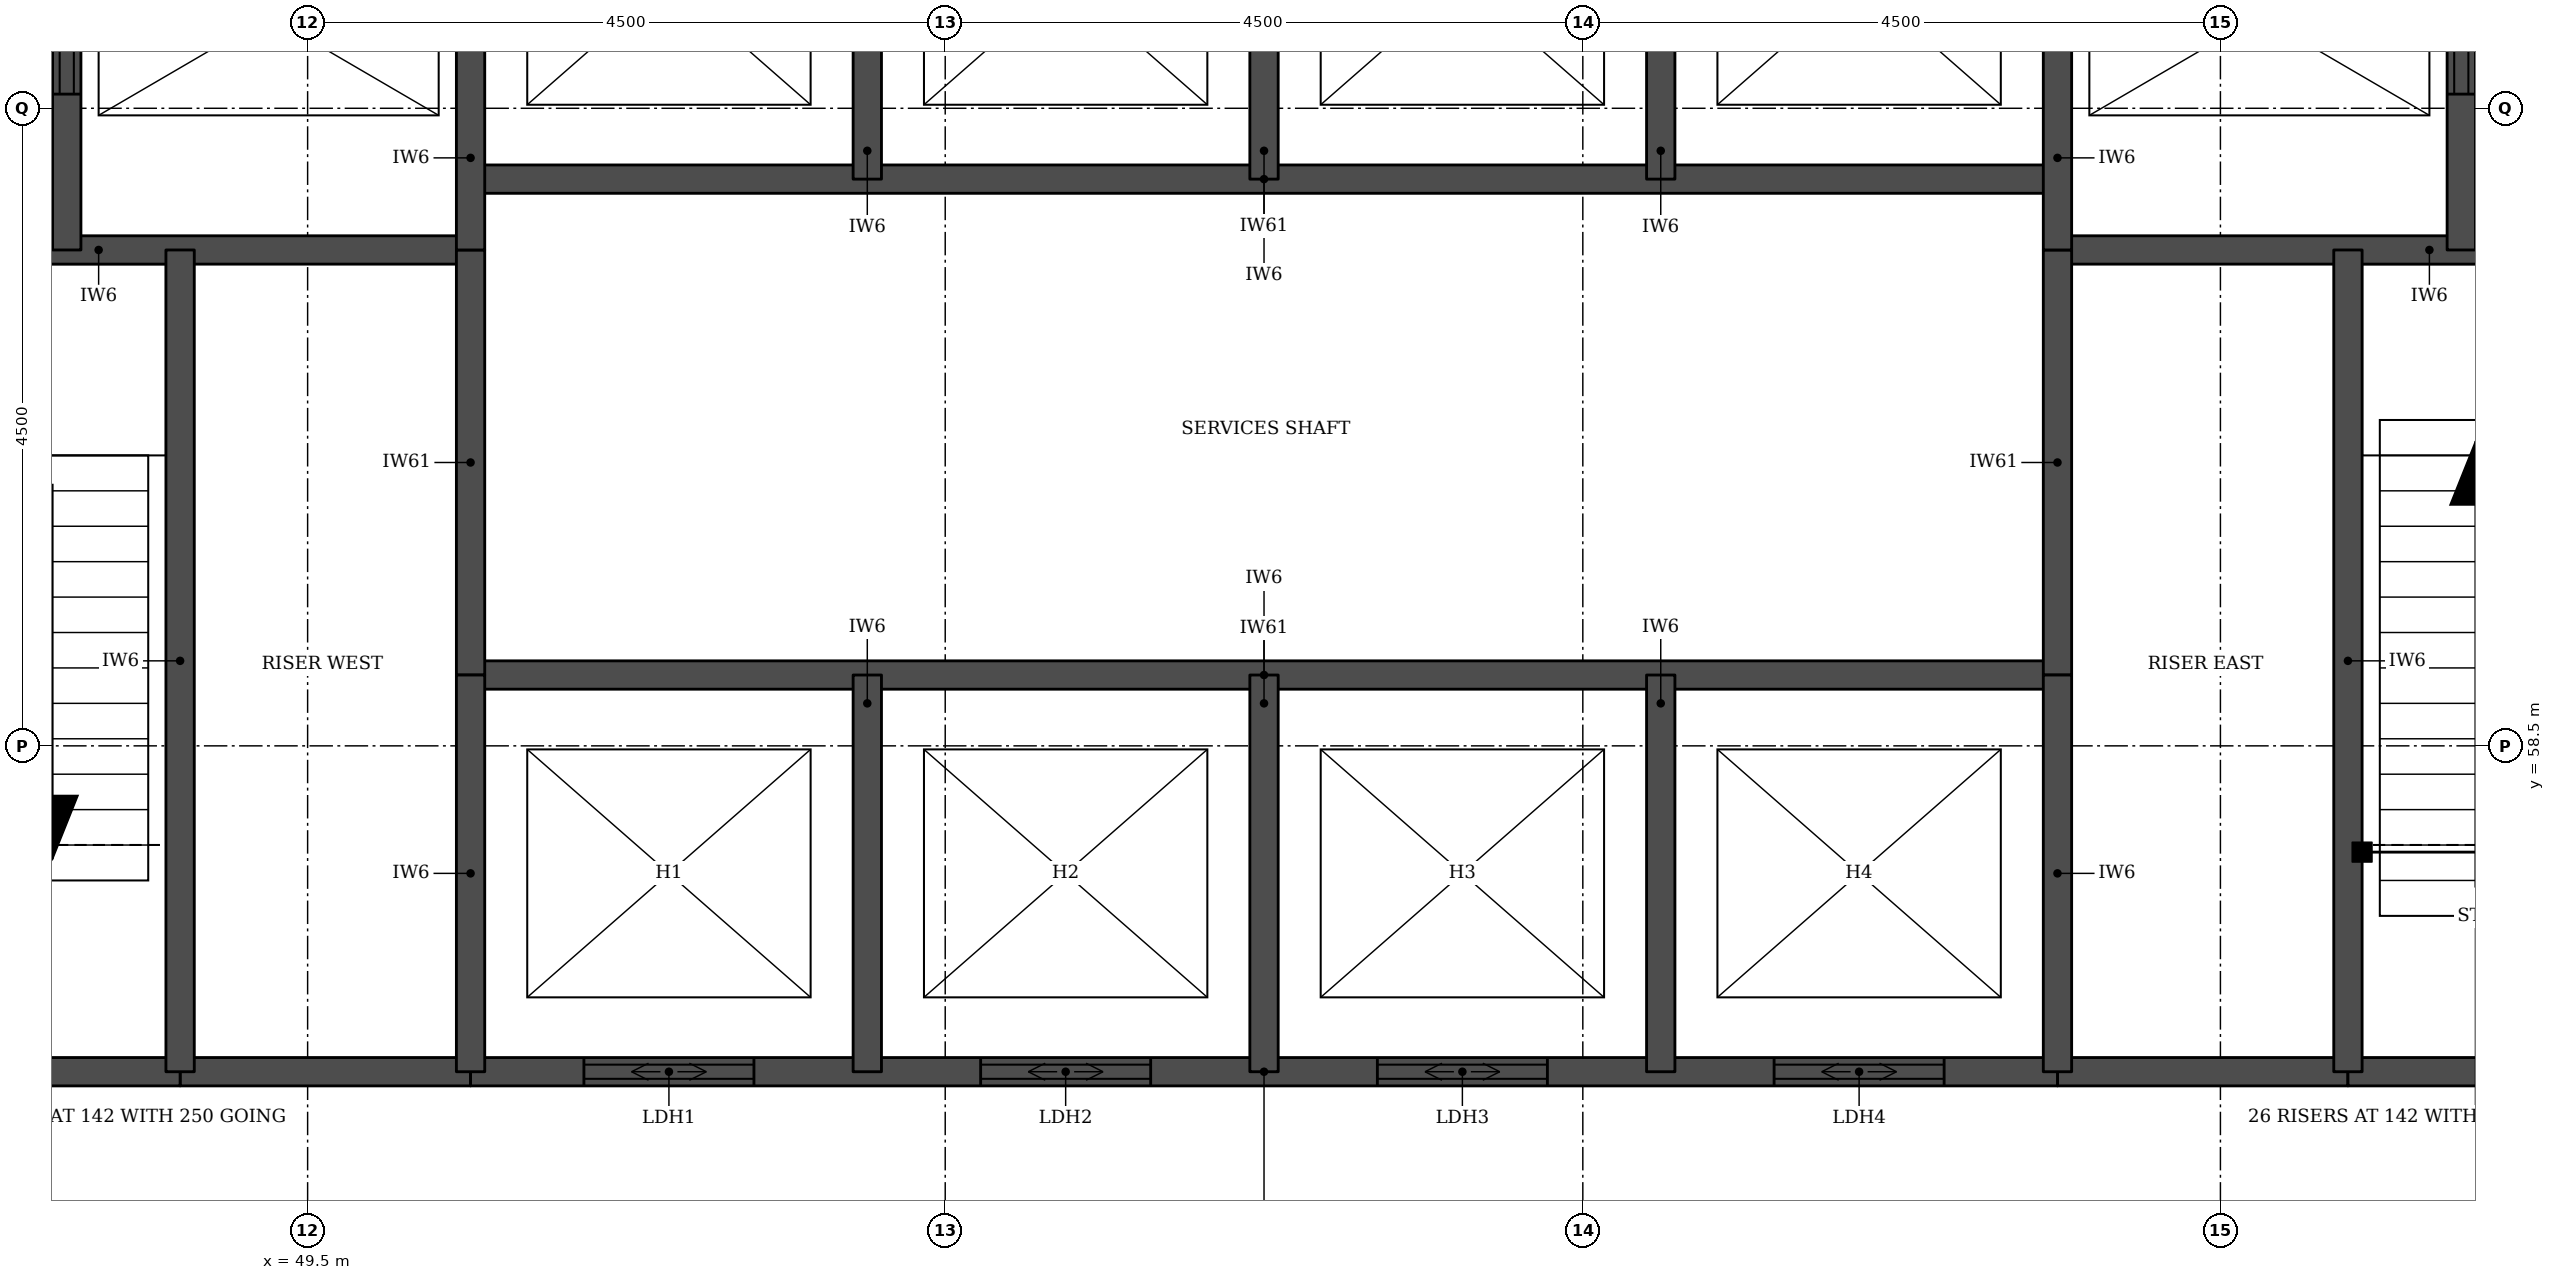
"""IFC4 building model, lengths in metres.
Left out: names, types, materials, properties, quantities, classifications, styles, units other than length and angle.
Written with IfcOpenShell. Run it as: python <this file> out.ifc"""

import sys

from ifc_helpers import new_model, si_unit, direction, frame, frame_2d, origin, place, context, subcontext, project, spatial, rectangle, extrude, element, fill, save


model = new_model("IFC4")
c1 = context("Model", 3, precision=1e-05, world=origin(), true_north=direction((0.0, 1.0)))
c2 = subcontext(c1, "Body", "Model", "MODEL_VIEW")
j1 = project(units=[si_unit("LENGTHUNIT", "METRE"), si_unit("PLANEANGLEUNIT", "RADIAN")], contexts=[c1])
p1 = place(None, origin())
s1 = spatial("IfcSite", under=j1, at=p1, CompositionType="ELEMENT")
p2 = place(p1, origin())
s2 = spatial("IfcBuilding", under=s1, at=p2, CompositionType="ELEMENT")
p3 = place(p2, frame((0.0, 0.0, 184.7)))
s3 = spatial("IfcBuildingStorey", under=s2, at=p3, CompositionType="ELEMENT", Elevation=184.7)
for number, where, z_axis, x_axis in (
    (1, (48.6, 56.2, 0.0), (0.0, 0.0, 1.0), (1.0, 0.0, 0.0)),
    (2, (61.85, 56.2, 0.0), (0.0, 0.0, 1.0), (1.0, 0.0, 0.0)),
):
    element("IfcWall", number, at=place(p3, frame(where, z_axis=z_axis, x_axis=x_axis)), inside=s3, PredefinedType="SOLIDWALL", context=c2, shape_type="SweptSolid", body=[
        extrude(rectangle(XDim=2.05, YDim=0.2, at=frame_2d((1.025, 0.0))), origin(), (0.0, 0.0, 1.0), 3.55),
    ])
p4 = place(p3, frame((45.4, 56.2, 0.0), z_axis=(0.0, 0.0, 1.0), x_axis=(1.0, 0.0, 0.0)))
e3 = element("IfcWall", 3, at=p4, inside=s3, PredefinedType="SOLIDWALL", context=c2, shape_type="SweptSolid", body=[
    extrude(rectangle(XDim=3.2, YDim=0.2, at=frame_2d((1.6, 0.0))), origin(), (0.0, 0.0, 1.0), 3.55),
])
p5 = place(p3, frame((50.65, 56.2, 0.0), z_axis=(0.0, 0.0, 1.0), x_axis=(1.0, 0.0, 0.0)))
e4 = element("IfcWall", 4, at=p5, inside=s3, PredefinedType="SOLIDWALL", context=c2, shape_type="SweptSolid", body=[
    extrude(rectangle(XDim=11.2, YDim=0.2, at=frame_2d((5.6, 0.0))), origin(), (0.0, 0.0, 1.0), 3.55),
])
p6 = place(p5, frame((0.8, 0.0, 0.0)))
e5 = element("IfcOpeningElement", 5, at=p6, cuts=e4, PredefinedType="OPENING", context=c2, shape_type="SweptSolid", body=[
    extrude(rectangle(XDim=1.2, YDim=2.1, at=frame_2d((0.6, 1.05))), frame((0.0, 0.11, 0.0), z_axis=(0.0, -1.0, 0.0), x_axis=(1.0, 0.0, 0.0)), (0.0, 0.0, 1.0), 0.22),
])
p7 = place(p5, frame((3.6, 0.0, 0.0)))
e6 = element("IfcOpeningElement", 6, at=p7, cuts=e4, PredefinedType="OPENING", context=c2, shape_type="SweptSolid", body=[
    extrude(rectangle(XDim=1.2, YDim=2.1, at=frame_2d((0.6, 1.05))), frame((0.0, 0.11, 0.0), z_axis=(0.0, -1.0, 0.0), x_axis=(1.0, 0.0, 0.0)), (0.0, 0.0, 1.0), 0.22),
])
p8 = place(p5, frame((6.4, 0.0, 0.0)))
e7 = element("IfcOpeningElement", 7, at=p8, cuts=e4, PredefinedType="OPENING", context=c2, shape_type="SweptSolid", body=[
    extrude(rectangle(XDim=1.2, YDim=2.1, at=frame_2d((0.6, 1.05))), frame((0.0, 0.11, 0.0), z_axis=(0.0, -1.0, 0.0), x_axis=(1.0, 0.0, 0.0)), (0.0, 0.0, 1.0), 0.22),
])
p9 = place(p5, frame((9.2, 0.0, 0.0)))
e8 = element("IfcOpeningElement", 8, at=p9, cuts=e4, PredefinedType="OPENING", context=c2, shape_type="SweptSolid", body=[
    extrude(rectangle(XDim=1.2, YDim=2.1, at=frame_2d((0.6, 1.05))), frame((0.0, 0.11, 0.0), z_axis=(0.0, -1.0, 0.0), x_axis=(1.0, 0.0, 0.0)), (0.0, 0.0, 1.0), 0.22),
])
p10 = place(p3, frame((63.9, 56.2, 0.0), z_axis=(0.0, 0.0, 1.0), x_axis=(1.0, 0.0, 0.0)))
e9 = element("IfcWall", 9, at=p10, inside=s3, PredefinedType="SOLIDWALL", context=c2, shape_type="SweptSolid", body=[
    extrude(rectangle(XDim=3.2, YDim=0.2, at=frame_2d((1.6, 0.0))), origin(), (0.0, 0.0, 1.0), 3.55),
])
p11 = place(p3, frame((50.65, 59.0, 0.0), z_axis=(0.0, 0.0, 1.0), x_axis=(1.0, 0.0, 0.0)))
e10 = element("IfcWall", 10, at=p11, inside=s3, PredefinedType="SOLIDWALL", context=c2, shape_type="SweptSolid", body=[
    extrude(rectangle(XDim=11.2, YDim=0.2, at=frame_2d((5.6, 0.0))), origin(), (0.0, 0.0, 1.0), 3.7),
])
for number, where, z_axis, x_axis in (
    (11, (45.4, 62.0, 0.0), (0.0, 0.0, 1.0), (1.0, 0.0, 0.0)),
    (12, (61.85, 62.0, 0.0), (0.0, 0.0, 1.0), (1.0, 0.0, 0.0)),
):
    element("IfcWall", number, at=place(p3, frame(where, z_axis=z_axis, x_axis=x_axis)), inside=s3, PredefinedType="SOLIDWALL", context=c2, shape_type="SweptSolid", body=[
        extrude(rectangle(XDim=5.25, YDim=0.2, at=frame_2d((2.625, 0.0))), origin(), (0.0, 0.0, 1.0), 3.55),
    ])
p12 = place(p3, frame((50.65, 62.5, 0.0), z_axis=(0.0, 0.0, 1.0), x_axis=(1.0, 0.0, 0.0)))
e13 = element("IfcWall", 13, at=p12, inside=s3, PredefinedType="SOLIDWALL", context=c2, shape_type="SweptSolid", body=[
    extrude(rectangle(XDim=11.2, YDim=0.2, at=frame_2d((5.6, 0.0))), origin(), (0.0, 0.0, 1.0), 3.7),
])
p13 = place(p3, frame((47.8, 62.0, 0.0), z_axis=(0.0, 0.0, 1.0), x_axis=(0.0, 1.0, 0.0)))
e14 = element("IfcWall", 14, at=p13, inside=s3, PredefinedType="SOLIDWALL", context=c2, shape_type="SweptSolid", body=[
    extrude(rectangle(XDim=3.3, YDim=0.2, at=frame_2d((1.65, 0.0))), origin(), (0.0, 0.0, 1.0), 3.55),
])
p14 = place(p13, frame((1.1, 0.0, 0.0)))
e15 = element("IfcOpeningElement", 15, at=p14, cuts=e14, PredefinedType="OPENING", context=c2, shape_type="SweptSolid", body=[
    extrude(rectangle(XDim=1.1, YDim=2.1, at=frame_2d((0.55, 1.05))), frame((0.0, 0.11, 0.0), z_axis=(0.0, -1.0, 0.0), x_axis=(1.0, 0.0, 0.0)), (0.0, 0.0, 1.0), 0.22),
])
p15 = place(p3, frame((48.6, 56.2, 0.0), z_axis=(0.0, 0.0, 1.0), x_axis=(0.0, 1.0, 0.0)))
e16 = element("IfcWall", 16, at=p15, inside=s3, PredefinedType="SOLIDWALL", context=c2, shape_type="SweptSolid", body=[
    extrude(rectangle(XDim=5.8, YDim=0.2, at=frame_2d((2.9, 0.0))), origin(), (0.0, 0.0, 1.0), 3.55),
])
p16 = place(p3, frame((50.65, 59.0, 0.0), z_axis=(0.0, 0.0, 1.0), x_axis=(0.0, 1.0, 0.0)))
e17 = element("IfcWall", 17, at=p16, inside=s3, PredefinedType="SOLIDWALL", context=c2, shape_type="SweptSolid", body=[
    extrude(rectangle(XDim=3.0, YDim=0.2, at=frame_2d((1.5, 0.0))), origin(), (0.0, 0.0, 1.0), 3.7),
])
p17 = place(p3, frame((50.65, 56.2, 0.0), z_axis=(0.0, 0.0, 1.0), x_axis=(0.0, 1.0, 0.0)))
e18 = element("IfcWall", 18, at=p17, inside=s3, PredefinedType="SOLIDWALL", context=c2, shape_type="SweptSolid", body=[
    extrude(rectangle(XDim=2.8, YDim=0.2, at=frame_2d((1.4, 0.0))), origin(), (0.0, 0.0, 1.0), 3.55),
])
p18 = place(p3, frame((50.65, 62.0, 0.0), z_axis=(0.0, 0.0, 1.0), x_axis=(0.0, 1.0, 0.0)))
e19 = element("IfcWall", 19, at=p18, inside=s3, PredefinedType="SOLIDWALL", context=c2, shape_type="SweptSolid", body=[
    extrude(rectangle(XDim=3.3, YDim=0.2, at=frame_2d((1.65, 0.0))), origin(), (0.0, 0.0, 1.0), 3.55),
])
for number, where, z_axis, x_axis in (
    (20, (53.45, 56.2, 0.0), (0.0, 0.0, 1.0), (0.0, 1.0, 0.0)),
    (21, (53.45, 62.5, 0.0), (0.0, 0.0, 1.0), (0.0, 1.0, 0.0)),
    (22, (56.25, 56.2, 0.0), (0.0, 0.0, 1.0), (0.0, 1.0, 0.0)),
    (23, (56.25, 62.5, 0.0), (0.0, 0.0, 1.0), (0.0, 1.0, 0.0)),
    (24, (59.05, 56.2, 0.0), (0.0, 0.0, 1.0), (0.0, 1.0, 0.0)),
    (25, (59.05, 62.5, 0.0), (0.0, 0.0, 1.0), (0.0, 1.0, 0.0)),
):
    element("IfcWall", number, at=place(p3, frame(where, z_axis=z_axis, x_axis=x_axis)), inside=s3, PredefinedType="SOLIDWALL", context=c2, shape_type="SweptSolid", body=[
        extrude(rectangle(XDim=2.8, YDim=0.2, at=frame_2d((1.4, 0.0))), origin(), (0.0, 0.0, 1.0), 3.55),
    ])
p19 = place(p3, frame((61.85, 59.0, 0.0), z_axis=(0.0, 0.0, 1.0), x_axis=(0.0, 1.0, 0.0)))
e26 = element("IfcWall", 26, at=p19, inside=s3, PredefinedType="SOLIDWALL", context=c2, shape_type="SweptSolid", body=[
    extrude(rectangle(XDim=3.0, YDim=0.2, at=frame_2d((1.5, 0.0))), origin(), (0.0, 0.0, 1.0), 3.7),
])
p20 = place(p3, frame((61.85, 56.2, 0.0), z_axis=(0.0, 0.0, 1.0), x_axis=(0.0, 1.0, 0.0)))
e27 = element("IfcWall", 27, at=p20, inside=s3, PredefinedType="SOLIDWALL", context=c2, shape_type="SweptSolid", body=[
    extrude(rectangle(XDim=2.8, YDim=0.2, at=frame_2d((1.4, 0.0))), origin(), (0.0, 0.0, 1.0), 3.55),
])
p21 = place(p3, frame((61.85, 62.0, 0.0), z_axis=(0.0, 0.0, 1.0), x_axis=(0.0, 1.0, 0.0)))
e28 = element("IfcWall", 28, at=p21, inside=s3, PredefinedType="SOLIDWALL", context=c2, shape_type="SweptSolid", body=[
    extrude(rectangle(XDim=3.3, YDim=0.2, at=frame_2d((1.65, 0.0))), origin(), (0.0, 0.0, 1.0), 3.55),
])
p22 = place(p3, frame((63.9, 56.2, 0.0), z_axis=(0.0, 0.0, 1.0), x_axis=(0.0, 1.0, 0.0)))
e29 = element("IfcWall", 29, at=p22, inside=s3, PredefinedType="SOLIDWALL", context=c2, shape_type="SweptSolid", body=[
    extrude(rectangle(XDim=5.8, YDim=0.2, at=frame_2d((2.9, 0.0))), origin(), (0.0, 0.0, 1.0), 3.55),
])
p23 = place(p3, frame((64.7, 62.0, 0.0), z_axis=(0.0, 0.0, 1.0), x_axis=(0.0, 1.0, 0.0)))
e30 = element("IfcWall", 30, at=p23, inside=s3, PredefinedType="SOLIDWALL", context=c2, shape_type="SweptSolid", body=[
    extrude(rectangle(XDim=3.3, YDim=0.2, at=frame_2d((1.65, 0.0))), origin(), (0.0, 0.0, 1.0), 3.55),
])
p24 = place(p23, frame((1.1, 0.0, 0.0)))
e31 = element("IfcOpeningElement", 31, at=p24, cuts=e30, PredefinedType="OPENING", context=c2, shape_type="SweptSolid", body=[
    extrude(rectangle(XDim=1.1, YDim=2.1, at=frame_2d((0.55, 1.05))), frame((0.0, 0.11, 0.0), z_axis=(0.0, -1.0, 0.0), x_axis=(1.0, 0.0, 0.0)), (0.0, 0.0, 1.0), 0.22),
])
p25 = place(p6, origin())
e32 = element("IfcDoor", 32, at=p25, inside=s3, OperationType="DOUBLE_DOOR_SLIDING", PredefinedType="DOOR", context=c2, shape_type="SweptSolid", body=[
    extrude(rectangle(XDim=1.2, YDim=2.1, at=frame_2d((0.6, 1.05))), frame((0.0, 0.025, 0.0), z_axis=(0.0, -1.0, 0.0), x_axis=(1.0, 0.0, 0.0)), (0.0, 0.0, 1.0), 0.05),
])
fill(e5, e32)
p26 = place(p7, origin())
e33 = element("IfcDoor", 33, at=p26, inside=s3, OperationType="DOUBLE_DOOR_SLIDING", PredefinedType="DOOR", context=c2, shape_type="SweptSolid", body=[
    extrude(rectangle(XDim=1.2, YDim=2.1, at=frame_2d((0.6, 1.05))), frame((0.0, 0.025, 0.0), z_axis=(0.0, -1.0, 0.0), x_axis=(1.0, 0.0, 0.0)), (0.0, 0.0, 1.0), 0.05),
])
fill(e6, e33)
p27 = place(p8, origin())
e34 = element("IfcDoor", 34, at=p27, inside=s3, OperationType="DOUBLE_DOOR_SLIDING", PredefinedType="DOOR", context=c2, shape_type="SweptSolid", body=[
    extrude(rectangle(XDim=1.2, YDim=2.1, at=frame_2d((0.6, 1.05))), frame((0.0, 0.025, 0.0), z_axis=(0.0, -1.0, 0.0), x_axis=(1.0, 0.0, 0.0)), (0.0, 0.0, 1.0), 0.05),
])
fill(e7, e34)
p28 = place(p9, origin())
e35 = element("IfcDoor", 35, at=p28, inside=s3, OperationType="DOUBLE_DOOR_SLIDING", PredefinedType="DOOR", context=c2, shape_type="SweptSolid", body=[
    extrude(rectangle(XDim=1.2, YDim=2.1, at=frame_2d((0.6, 1.05))), frame((0.0, 0.025, 0.0), z_axis=(0.0, -1.0, 0.0), x_axis=(1.0, 0.0, 0.0)), (0.0, 0.0, 1.0), 0.05),
])
fill(e8, e35)
p29 = place(p14, origin())
e36 = element("IfcDoor", 36, at=p29, inside=s3, OperationType="DOUBLE_DOOR_SLIDING", PredefinedType="DOOR", context=c2, shape_type="SweptSolid", body=[
    extrude(rectangle(XDim=1.1, YDim=2.1, at=frame_2d((0.55, 1.05))), frame((0.0, 0.025, 0.0), z_axis=(0.0, -1.0, 0.0), x_axis=(1.0, 0.0, 0.0)), (0.0, 0.0, 1.0), 0.05),
])
fill(e15, e36)
p30 = place(p24, origin())
e37 = element("IfcDoor", 37, at=p30, inside=s3, OperationType="DOUBLE_DOOR_SLIDING", PredefinedType="DOOR", context=c2, shape_type="SweptSolid", body=[
    extrude(rectangle(XDim=1.1, YDim=2.1, at=frame_2d((0.55, 1.05))), frame((0.0, 0.025, 0.0), z_axis=(0.0, -1.0, 0.0), x_axis=(1.0, 0.0, 0.0)), (0.0, 0.0, 1.0), 0.05),
])
fill(e31, e37)
save(model, sys.argv[1])
